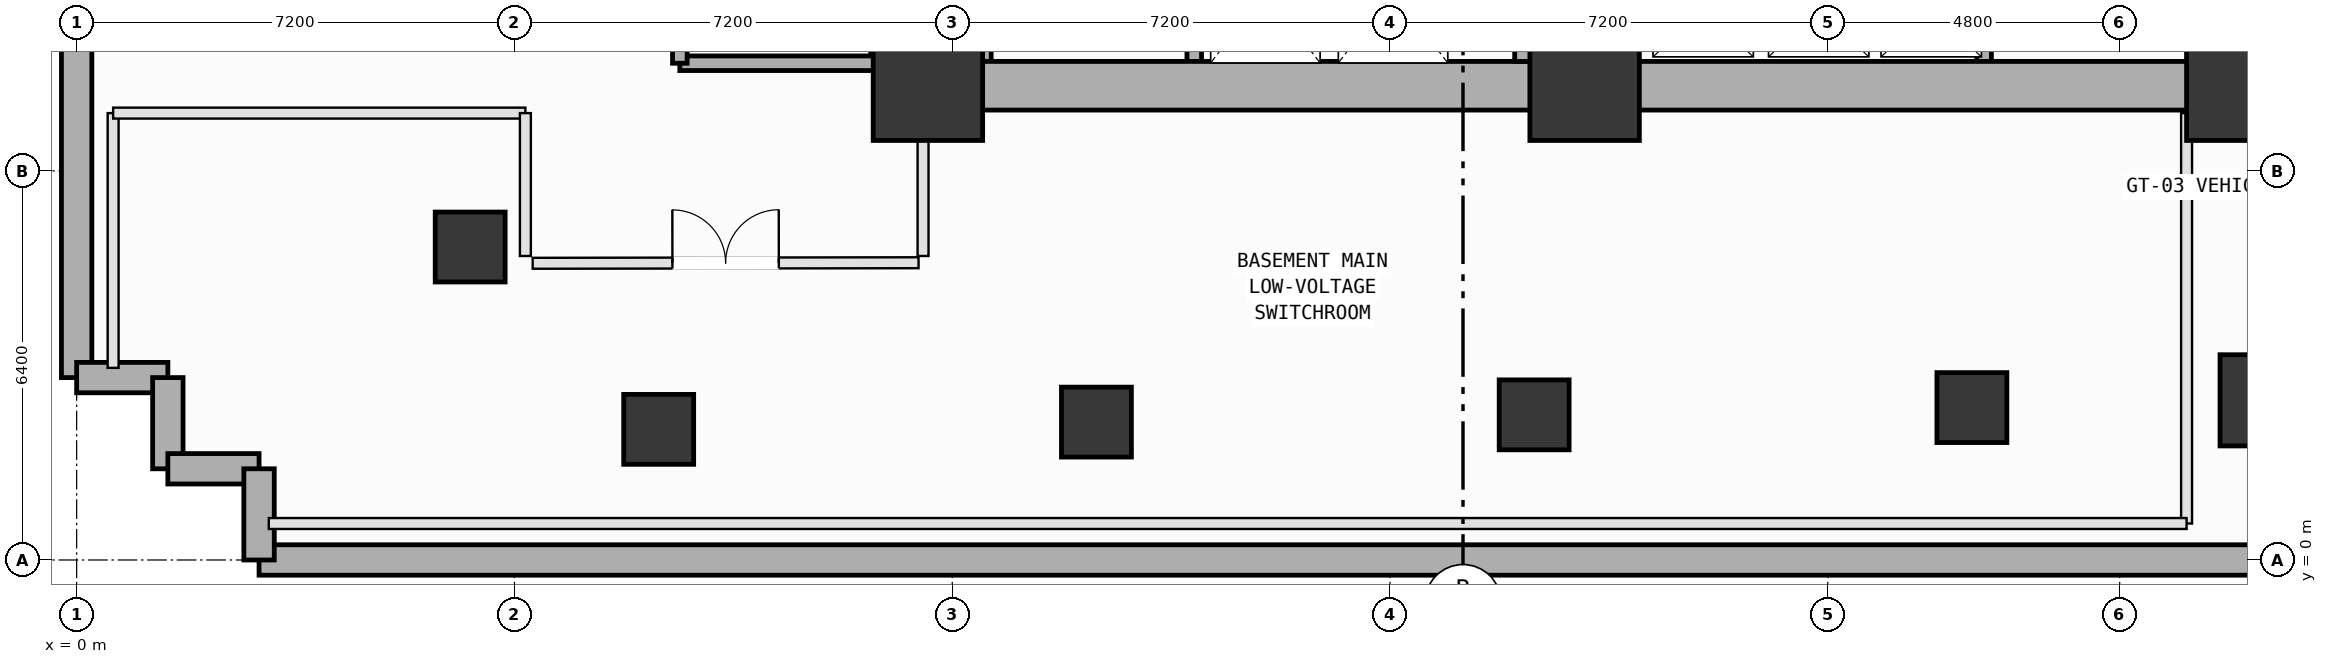
"""IFC4 building model, lengths in metres.
Left out: names, types, materials, properties, quantities, classifications, styles, units other than length and angle.
Written with IfcOpenShell. Run it as: python <this file> out.ifc"""

import sys

from ifc_helpers import new_model, si_unit, direction, frame, frame_2d, origin, origin_2d, place, context, subcontext, project, spatial, rectangle, extrude, element, fill, save


model = new_model("IFC4")
c1 = context("Model", 3, precision=1e-05, world=origin(), true_north=direction((0.0, 1.0)))
c2 = subcontext(c1, "Body", "Model", "MODEL_VIEW")
j1 = project(units=[si_unit("LENGTHUNIT", "METRE"), si_unit("PLANEANGLEUNIT", "RADIAN")], contexts=[c1])
p1 = place(None, origin())
s1 = spatial("IfcSite", under=j1, at=p1, CompositionType="ELEMENT")
p2 = place(p1, origin())
s2 = spatial("IfcBuilding", under=s1, at=p2, CompositionType="ELEMENT")
p3 = place(p2, frame((0.0, 0.0, -9.6)))
s3 = spatial("IfcBuildingStorey", under=s2, at=p3, CompositionType="ELEMENT", Elevation=-9.6)
for number, where, z_axis, x_axis in (
    (1, (14.0, 7.8, 0.0), (0.0, 0.0, 1.0), (1.0, 0.0, 0.0)),
    (2, (24.8, 7.8, 0.0), (0.0, 0.0, 1.0), (1.0, 0.0, 0.0)),
    (3, (35.6, 7.8, 0.0), (0.0, 0.0, 1.0), (1.0, 0.0, 0.0)),
):
    element("IfcColumn", number, at=place(p3, frame(where, z_axis=z_axis, x_axis=x_axis)), inside=s3, PredefinedType="COLUMN", context=c2, shape_type="SweptSolid", body=[
        extrude(rectangle(XDim=1.8, YDim=1.8, at=origin_2d()), origin(), (0.0, 0.0, 1.0), 4.8),
    ])
p4 = place(p3, frame((36.0, 2.626, 0.0), z_axis=(0.0, 0.0, 1.0), x_axis=(1.0, 0.0, 0.0)))
e4 = element("IfcColumn", 4, at=p4, inside=s3, PredefinedType="PILASTER", context=c2, shape_type="SweptSolid", body=[
    extrude(rectangle(XDim=1.5, YDim=1.5, at=origin_2d()), origin(), (0.0, 0.0, 1.0), 4.8),
])
for number, where, z_axis, x_axis in (
    (5, (9.572, 2.148, 0.0), (0.0, 0.0, 1.0), (1.0, 0.0, 0.0)),
    (6, (16.771, 2.268, 0.0), (0.0, 0.0, 1.0), (1.0, 0.0, 0.0)),
    (7, (23.97, 2.387, 0.0), (0.0, 0.0, 1.0), (1.0, 0.0, 0.0)),
    (8, (31.169, 2.507, 0.0), (0.0, 0.0, 1.0), (1.0, 0.0, 0.0)),
    (9, (6.472, 5.147, 0.0), (0.0, 0.0, 1.0), (1.0, 0.0, 0.0)),
):
    element("IfcColumn", number, at=place(p3, frame(where, z_axis=z_axis, x_axis=x_axis)), inside=s3, PredefinedType="COLUMN", context=c2, shape_type="SweptSolid", body=[
        extrude(rectangle(XDim=1.15, YDim=1.15, at=origin_2d()), origin(), (0.0, 0.0, 1.0), 4.8),
    ])
p5 = place(p3, frame((79.8, 0.0, 0.0), z_axis=(0.0, 0.0, 1.0), x_axis=(-1.0, 0.0, 0.0)))
e10 = element("IfcWall", 10, at=p5, inside=s3, PredefinedType="USERDEFINED", context=c2, shape_type="SweptSolid", body=[
    extrude(rectangle(XDim=76.8, YDim=0.5, at=frame_2d((38.4, 0.0))), origin(), (0.0, 0.0, 1.0), 4.55),
])
p6 = place(p3, frame((0.0, 3.0, 0.0), z_axis=(0.0, 0.0, 1.0), x_axis=(0.0, 1.0, 0.0)))
e11 = element("IfcWall", 11, at=p6, inside=s3, PredefinedType="USERDEFINED", context=c2, shape_type="SweptSolid", body=[
    extrude(rectangle(XDim=45.2, YDim=0.5, at=frame_2d((22.6, 0.0))), origin(), (0.0, 0.0, 1.0), 4.55),
])
for number, where, z_axis, x_axis in (
    (12, (1.5, 3.0, 0.0), (0.0, 0.0, 1.0), (-1.0, 0.0, 0.0)),
    (13, (1.5, 1.5, 0.0), (0.0, 0.0, 1.0), (0.0, 1.0, 0.0)),
    (14, (3.0, 1.5, 0.0), (0.0, 0.0, 1.0), (-1.0, 0.0, 0.0)),
    (15, (3.0, 0.0, 0.0), (0.0, 0.0, 1.0), (0.0, 1.0, 0.0)),
):
    element("IfcWall", number, at=place(p3, frame(where, z_axis=z_axis, x_axis=x_axis)), inside=s3, PredefinedType="USERDEFINED", context=c2, shape_type="SweptSolid", body=[
        extrude(rectangle(XDim=1.5, YDim=0.5, at=frame_2d((0.75, 0.0))), origin(), (0.0, 0.0, 1.0), 4.55),
    ])
for number, where, z_axis, x_axis in (
    (16, (18.38, 15.12, 0.0), (0.0, 0.0, 1.0), (0.0, -1.0, 0.0)),
    (17, (14.92, 8.2, 0.0), (0.0, 0.0, 1.0), (0.0, 1.0, 0.0)),
    (18, (34.83, 15.12, 0.0), (0.0, 0.0, 1.0), (0.0, -1.0, 0.0)),
    (19, (31.37, 8.2, 0.0), (0.0, 0.0, 1.0), (0.0, 1.0, 0.0)),
):
    element("IfcWall", number, at=place(p3, frame(where, z_axis=z_axis, x_axis=x_axis)), inside=s3, PredefinedType="SOLIDWALL", context=c2, shape_type="SweptSolid", body=[
        extrude(rectangle(XDim=6.92, YDim=0.24, at=frame_2d((3.46, 0.0))), origin(), (0.0, 0.0, 1.0), 4.55),
    ])
p7 = place(p3, frame((13.18, 15.22, 0.0), z_axis=(0.0, 0.0, 1.0), x_axis=(0.0, -1.0, 0.0)))
e20 = element("IfcWall", 20, at=p7, inside=s3, PredefinedType="SOLIDWALL", context=c2, shape_type="SweptSolid", body=[
    extrude(rectangle(XDim=7.05, YDim=0.24, at=frame_2d((3.525, 0.0))), origin(), (0.0, 0.0, 1.0), 4.55),
])
p8 = place(p3, frame((13.18, 8.17, 0.0), z_axis=(0.0, 0.0, 1.0), x_axis=(-1.0, 0.0, 0.0)))
e21 = element("IfcWall", 21, at=p8, inside=s3, PredefinedType="SOLIDWALL", context=c2, shape_type="SweptSolid", body=[
    extrude(rectangle(XDim=3.26, YDim=0.24, at=frame_2d((1.63, 0.0))), origin(), (0.0, 0.0, 1.0), 4.55),
])
p9 = place(p3, frame((9.92, 8.17, 0.0), z_axis=(0.0, 0.0, 1.0), x_axis=(0.0, 1.0, 0.0)))
e22 = element("IfcWall", 22, at=p9, inside=s3, PredefinedType="SOLIDWALL", context=c2, shape_type="SweptSolid", body=[
    extrude(rectangle(XDim=7.05, YDim=0.24, at=frame_2d((3.525, 0.0))), origin(), (0.0, 0.0, 1.0), 4.55),
])
for number, where, z_axis, x_axis in (
    (23, (14.0, 7.8, 0.0), (0.0, 0.0, 1.0), (1.0, 0.0, 0.0)),
    (24, (24.8, 7.8, 0.0), (0.0, 0.0, 1.0), (1.0, 0.0, 0.0)),
):
    element("IfcWall", number, at=place(p3, frame(where, z_axis=z_axis, x_axis=x_axis)), inside=s3, PredefinedType="SHEAR", context=c2, shape_type="SweptSolid", body=[
        extrude(rectangle(XDim=10.8, YDim=0.8, at=frame_2d((5.4, 0.0))), origin(), (0.0, 0.0, 1.0), 4.55),
    ])
for number, where, z_axis, x_axis in (
    (25, (35.6, 7.8, 0.0), (0.0, 0.0, 1.0), (0.0, 1.0, 0.0)),
    (26, (14.0, 16.8, 0.0), (0.0, 0.0, 1.0), (0.0, -1.0, 0.0)),
):
    element("IfcWall", number, at=place(p3, frame(where, z_axis=z_axis, x_axis=x_axis)), inside=s3, PredefinedType="SHEAR", context=c2, shape_type="SweptSolid", body=[
        extrude(rectangle(XDim=9.0, YDim=0.8, at=frame_2d((4.5, 0.0))), origin(), (0.0, 0.0, 1.0), 4.55),
    ])
p10 = place(p3, frame((23.8, 8.2, 0.0), z_axis=(0.0, 0.0, 1.0), x_axis=(0.0, 1.0, 0.0)))
e27 = element("IfcWall", 27, at=p10, inside=s3, PredefinedType="SOLIDWALL", context=c2, shape_type="SweptSolid", body=[
    extrude(rectangle(XDim=2.48, YDim=0.3, at=frame_2d((1.24, 0.0))), origin(), (0.0, 0.0, 1.0), 4.55),
])
p11 = place(p3, frame((0.6, 3.16, 0.0), z_axis=(0.0, 0.0, 1.0), x_axis=(0.0, 1.0, 0.0)))
e28 = element("IfcWall", 28, at=p11, inside=s3, PredefinedType="PARTITIONING", context=c2, shape_type="SweptSolid", body=[
    extrude(rectangle(XDim=4.19, YDim=0.18, at=frame_2d((2.095, 0.0))), origin(), (0.0, 0.0, 1.0), 4.55),
])
p12 = place(p3, frame((0.6, 7.35, 0.0), z_axis=(0.0, 0.0, 1.0), x_axis=(1.0, 0.0, 0.0)))
e29 = element("IfcWall", 29, at=p12, inside=s3, PredefinedType="PARTITIONING", context=c2, shape_type="SweptSolid", body=[
    extrude(rectangle(XDim=6.78, YDim=0.18, at=frame_2d((3.39, 0.0))), origin(), (0.0, 0.0, 1.0), 4.55),
])
p13 = place(p3, frame((7.38, 7.35, 0.0), z_axis=(0.0, 0.0, 1.0), x_axis=(0.0, -1.0, 0.0)))
e30 = element("IfcWall", 30, at=p13, inside=s3, PredefinedType="PARTITIONING", context=c2, shape_type="SweptSolid", body=[
    extrude(rectangle(XDim=2.35, YDim=0.18, at=frame_2d((1.175, 0.0))), origin(), (0.0, 0.0, 1.0), 3.735),
])
p14 = place(p3, frame((7.5, 4.88, 0.0), z_axis=(0.0, 0.0, 1.0), x_axis=(0.999998986882, 0.00142345872, 0.0)))
e31 = element("IfcWall", 31, at=p14, inside=s3, PredefinedType="PARTITIONING", context=c2, shape_type="SweptSolid", body=[
    extrude(rectangle(XDim=6.346, YDim=0.18, at=frame_2d((3.173, 0.0))), origin(), (0.0, 0.0, 1.0), 3.735),
])
p15 = place(p14, frame((2.298, 0.0, 0.0)))
e32 = element("IfcOpeningElement", 32, at=p15, cuts=e31, PredefinedType="OPENING", context=c2, shape_type="SweptSolid", body=[
    extrude(rectangle(XDim=1.75, YDim=2.2, at=frame_2d((0.875, 1.1))), frame((0.0, 0.1, 0.0), z_axis=(0.0, -1.0, 0.0), x_axis=(1.0, 0.0, 0.0)), (0.0, 0.0, 1.0), 0.2),
])
p16 = place(p3, frame((13.92, 5.0, 0.0), z_axis=(0.0, 0.0, 1.0), x_axis=(0.0, 1.0, 0.0)))
e33 = element("IfcWall", 33, at=p16, inside=s3, PredefinedType="PARTITIONING", context=c2, shape_type="SweptSolid", body=[
    extrude(rectangle(XDim=2.35, YDim=0.18, at=frame_2d((1.175, 0.0))), origin(), (0.0, 0.0, 1.0), 4.55),
])
p17 = place(p3, frame((34.7, 7.35, 0.0), z_axis=(0.0, 0.0, 1.0), x_axis=(0.0, -1.0, 0.0)))
e34 = element("IfcWall", 34, at=p17, inside=s3, PredefinedType="PARTITIONING", context=c2, shape_type="SweptSolid", body=[
    extrude(rectangle(XDim=6.75, YDim=0.18, at=frame_2d((3.375, 0.0))), origin(), (0.0, 0.0, 1.0), 4.55),
])
p18 = place(p3, frame((34.7, 0.6, 0.0), z_axis=(0.0, 0.0, 1.0), x_axis=(-1.0, 0.0, 0.0)))
e35 = element("IfcWall", 35, at=p18, inside=s3, PredefinedType="PARTITIONING", context=c2, shape_type="SweptSolid", body=[
    extrude(rectangle(XDim=31.54, YDim=0.18, at=frame_2d((15.77, 0.0))), origin(), (0.0, 0.0, 1.0), 4.55),
])
p19 = place(p15, origin())
e36 = element("IfcDoor", 36, at=p19, inside=s3, OperationType="DOUBLE_DOOR_SINGLE_SWING", PredefinedType="DOOR", context=c2, shape_type="SweptSolid", body=[
    extrude(rectangle(XDim=1.75, YDim=2.2, at=frame_2d((0.875, 1.1))), frame((0.0, 0.025, 0.0), z_axis=(0.0, -1.0, 0.0), x_axis=(1.0, 0.0, 0.0)), (0.0, 0.0, 1.0), 0.05),
])
fill(e32, e36)
save(model, sys.argv[1])
